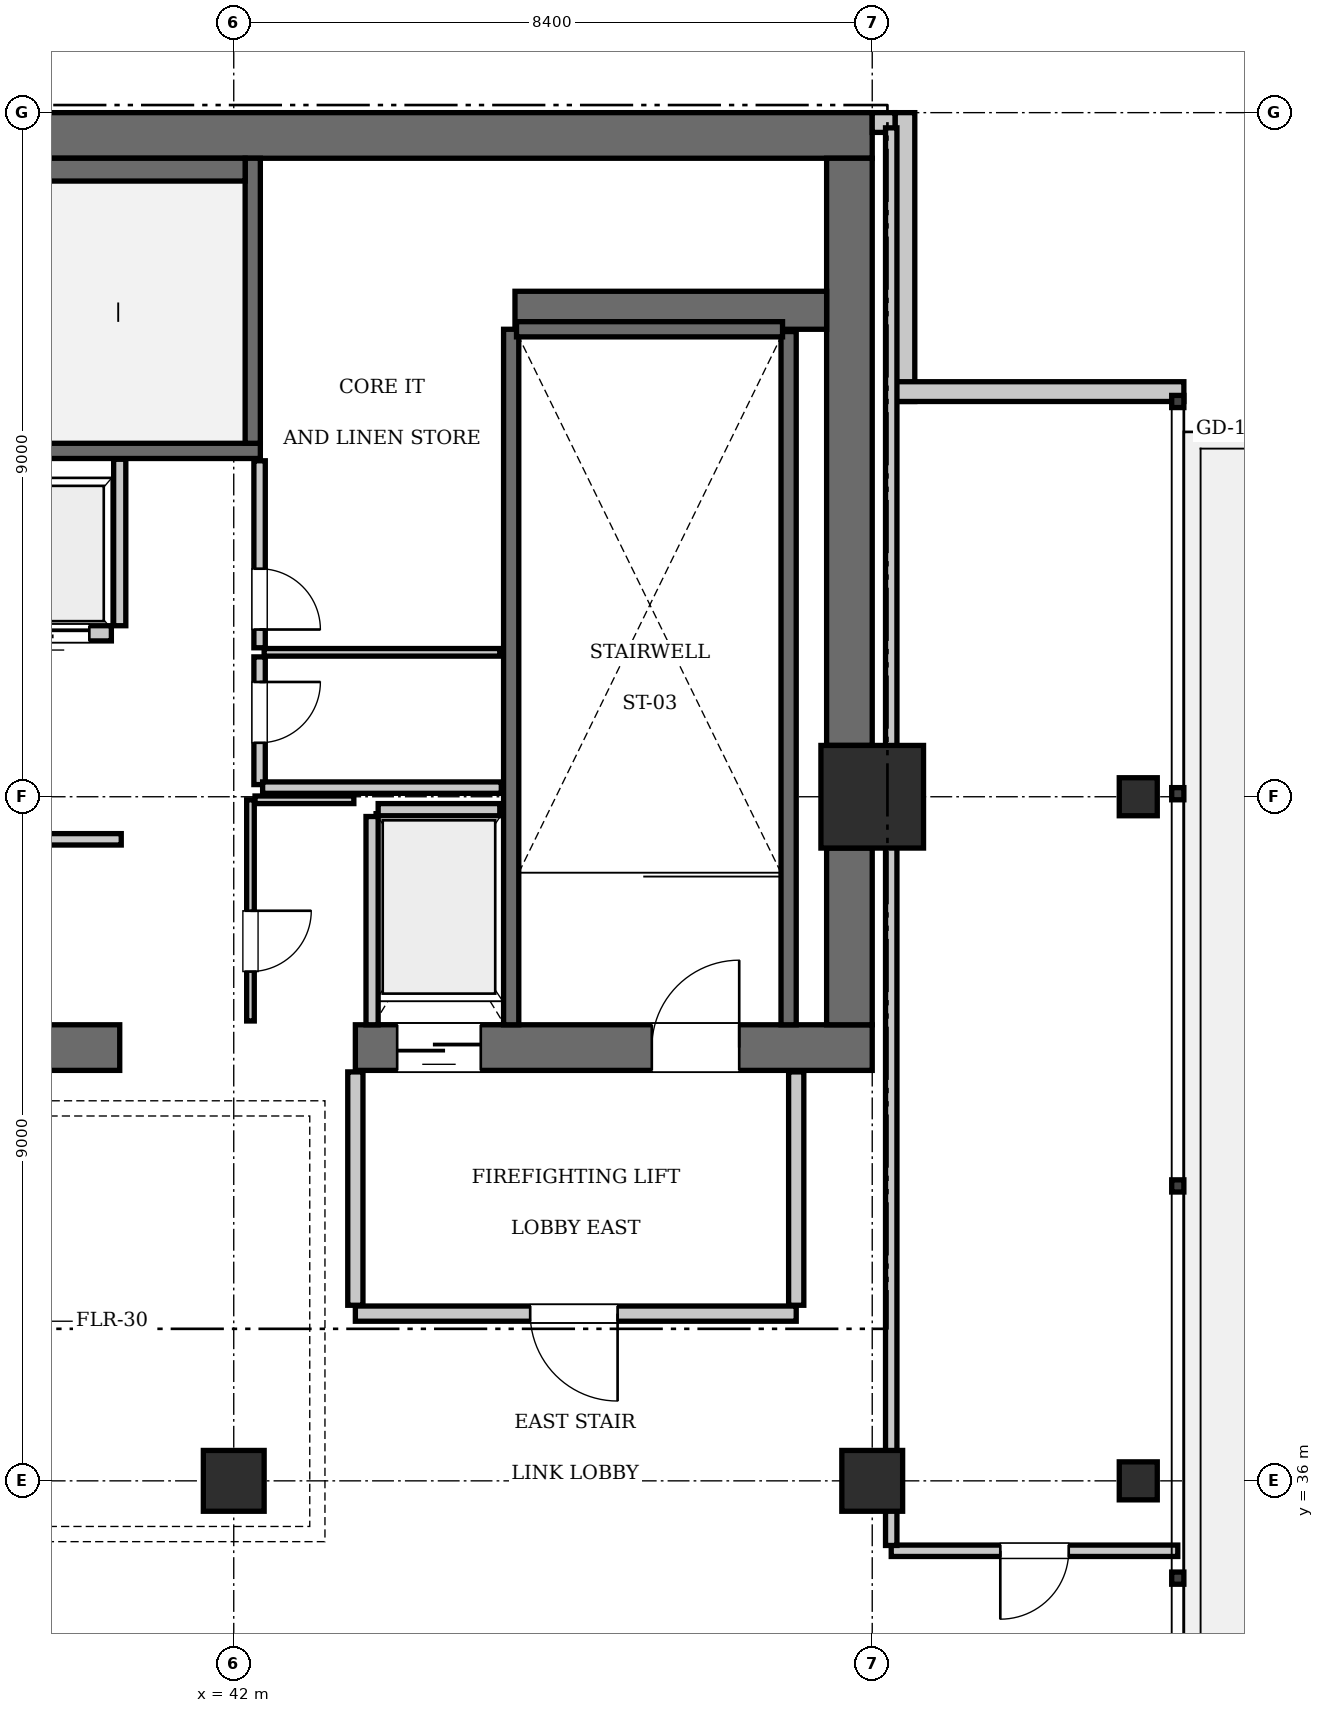
"""IFC4 building model, lengths in metres.
Left out: names, types, materials, properties, quantities, classifications, styles, units other than length and angle.
Written with IfcOpenShell. Run it as: python <this file> out.ifc"""

import sys

from ifc_helpers import new_model, si_unit, direction, frame, frame_2d, origin, origin_2d, place, context, subcontext, project, spatial, rectangle, i_section, extrude, element, fill, save


model = new_model("IFC4")
c1 = context("Model", 3, precision=1e-05, world=origin(), true_north=direction((0.0, 1.0)))
c2 = subcontext(c1, "Body", "Model", "MODEL_VIEW")
j1 = project(units=[si_unit("LENGTHUNIT", "METRE"), si_unit("PLANEANGLEUNIT", "RADIAN")], contexts=[c1])
p1 = place(None, origin())
s1 = spatial("IfcSite", under=j1, at=p1, CompositionType="ELEMENT")
p2 = place(p1, origin())
s2 = spatial("IfcBuilding", under=s1, at=p2, CompositionType="ELEMENT")
p3 = place(p2, frame((0.0, 0.0, 359.1)))
s3 = spatial("IfcBuildingStorey", under=s2, at=p3, CompositionType="ELEMENT", Elevation=359.1)
p4 = place(p3, frame((50.4, 45.0, 0.0), z_axis=(0.0, 0.0, 1.0), x_axis=(1.0, 0.0, 0.0)))
e1 = element("IfcColumn", 1, at=p4, inside=s3, PredefinedType="COLUMN", context=c2, shape_type="SweptSolid", body=[
    extrude(rectangle(XDim=1.35, YDim=1.35, at=origin_2d()), origin(), (0.0, 0.0, 1.0), 5.25),
])
p5 = place(p3, frame((25.2, 53.7, 0.0), z_axis=(0.0, 0.0, 1.0), x_axis=(1.0, 0.0, 0.0)))
e2 = element("IfcWall", 2, at=p5, inside=s3, PredefinedType="SHEAR", context=c2, shape_type="SweptSolid", body=[
    extrude(rectangle(XDim=25.2, YDim=0.6, at=frame_2d((12.6, 0.0))), origin(), (0.0, 0.0, 1.0), 5.25),
])
p6 = place(p3, frame((35.1, 41.7, 0.0), z_axis=(0.0, 0.0, 1.0), x_axis=(1.0, 0.0, 0.0)))
e3 = element("IfcWall", 3, at=p6, inside=s3, PredefinedType="SHEAR", context=c2, shape_type="SweptSolid", body=[
    extrude(rectangle(XDim=5.4, YDim=0.6, at=frame_2d((2.7, 0.0))), origin(), (0.0, 0.0, 1.0), 5.25),
])
p7 = place(p3, frame((43.6, 41.7, 0.0), z_axis=(0.0, 0.0, 1.0), x_axis=(1.0, 0.0, 0.0)))
e4 = element("IfcWall", 4, at=p7, inside=s3, PredefinedType="SHEAR", context=c2, shape_type="SweptSolid", body=[
    extrude(rectangle(XDim=6.8, YDim=0.6, at=frame_2d((3.4, 0.0))), origin(), (0.0, 0.0, 1.0), 5.25),
])
p8 = place(p7, frame((3.9, 0.0, 0.0)))
e5 = element("IfcOpeningElement", 5, at=p8, cuts=e4, PredefinedType="OPENING", context=c2, shape_type="SweptSolid", body=[
    extrude(rectangle(XDim=1.15, YDim=2.15, at=frame_2d((0.575, 1.075))), frame((0.0, 0.31, 0.0), z_axis=(0.0, -1.0, 0.0), x_axis=(1.0, 0.0, 0.0)), (0.0, 0.0, 1.0), 0.62),
])
p9 = place(p7, frame((0.55, 0.0, 0.0)))
e6 = element("IfcOpeningElement", 6, at=p9, cuts=e4, PredefinedType="OPENING", context=c2, shape_type="SweptSolid", body=[
    extrude(rectangle(XDim=1.1, YDim=2.2, at=frame_2d((0.55, 1.1))), frame((0.0, 0.31, 0.0), z_axis=(0.0, -1.0, 0.0), x_axis=(1.0, 0.0, 0.0)), (0.0, 0.0, 1.0), 0.62),
])
p10 = place(p3, frame((50.1, 42.0, 0.0), z_axis=(0.0, 0.0, 1.0), x_axis=(0.0, 1.0, 0.0)))
e7 = element("IfcWall", 7, at=p10, inside=s3, PredefinedType="SHEAR", context=c2, shape_type="SweptSolid", body=[
    extrude(rectangle(XDim=2.325, YDim=0.6, at=frame_2d((1.163, 0.0))), origin(), (0.0, 0.0, 1.0), 5.25),
])
p11 = place(p3, frame((50.1, 45.675, 0.0), z_axis=(0.0, 0.0, 1.0), x_axis=(0.0, 1.0, 0.0)))
e8 = element("IfcWall", 8, at=p11, inside=s3, PredefinedType="SHEAR", context=c2, shape_type="SweptSolid", body=[
    extrude(rectangle(XDim=7.725, YDim=0.6, at=frame_2d((3.862, 0.0))), origin(), (0.0, 0.0, 1.0), 5.25),
])
p12 = place(p3, frame((45.7, 51.4, 0.0), z_axis=(0.0, 0.0, 1.0), x_axis=(1.0, 0.0, 0.0)))
e9 = element("IfcWall", 9, at=p12, inside=s3, PredefinedType="SHEAR", context=c2, shape_type="SweptSolid", body=[
    extrude(rectangle(XDim=4.1, YDim=0.5, at=frame_2d((2.05, 0.0))), origin(), (0.0, 0.0, 1.0), 5.25),
])
for number, where, z_axis, x_axis in (
    (10, (42.0, 36.0, 0.0), (0.0, 0.0, 1.0), (1.0, 0.0, 0.0)),
    (11, (50.4, 36.0, 0.0), (0.0, 0.0, 1.0), (1.0, 0.0, 0.0)),
):
    element("IfcColumn", number, at=place(p3, frame(where, z_axis=z_axis, x_axis=x_axis)), inside=s3, PredefinedType="COLUMN", context=c2, shape_type="SweptSolid", body=[
        extrude(rectangle(XDim=0.8, YDim=0.8, at=origin_2d()), origin(), (0.0, 0.0, 1.0), 5.25),
    ])
for number, where, z_axis, x_axis in (
    (12, (53.9, 36.0, -0.26), (0.0, 0.0, 1.0), (1.0, 0.0, 0.0)),
    (13, (53.9, 45.0, -0.26), (0.0, 0.0, 1.0), (1.0, 0.0, 0.0)),
):
    element("IfcColumn", number, at=place(p3, frame(where, z_axis=z_axis, x_axis=x_axis)), inside=s3, PredefinedType="COLUMN", context=c2, shape_type="SweptSolid", body=[
        extrude(i_section(OverallWidth=0.5, OverallDepth=0.5, WebThickness=0.022, FlangeThickness=0.032, at=origin_2d()), origin(), (0.0, 0.0, 1.0), 5.51),
    ])
p13 = place(p3, frame((33.25, 49.55, 0.0), z_axis=(0.0, 0.0, 1.0), x_axis=(1.0, 0.0, 0.0)))
e14 = element("IfcWall", 14, at=p13, inside=s3, PredefinedType="SOLIDWALL", context=c2, shape_type="SweptSolid", body=[
    extrude(rectangle(XDim=9.1, YDim=0.2, at=frame_2d((4.55, 0.0))), origin(), (0.0, 0.0, 1.0), 4.97),
])
p14 = place(p3, frame((42.25, 49.65, 0.0), z_axis=(0.0, 0.0, 1.0), x_axis=(0.0, 1.0, 0.0)))
e15 = element("IfcWall", 15, at=p14, inside=s3, PredefinedType="SOLIDWALL", context=c2, shape_type="SweptSolid", body=[
    extrude(rectangle(XDim=3.75, YDim=0.2, at=frame_2d((1.875, 0.0))), origin(), (0.0, 0.0, 1.0), 4.97),
])
p15 = place(p3, frame((33.45, 53.25, 0.0), z_axis=(0.0, 0.0, 1.0), x_axis=(1.0, 0.0, 0.0)))
e16 = element("IfcWall", 16, at=p15, inside=s3, PredefinedType="SOLIDWALL", context=c2, shape_type="SweptSolid", body=[
    extrude(rectangle(XDim=8.7, YDim=0.3, at=frame_2d((4.35, 0.0))), origin(), (0.0, 0.0, 1.0), 4.97),
])
p16 = place(p3, frame((45.65, 42.0, 0.0), z_axis=(0.0, 0.0, 1.0), x_axis=(0.0, 1.0, 0.0)))
e17 = element("IfcWall", 17, at=p16, inside=s3, PredefinedType="SOLIDWALL", context=c2, shape_type="SweptSolid", body=[
    extrude(rectangle(XDim=9.15, YDim=0.2, at=frame_2d((4.575, 0.0))), origin(), (0.0, 0.0, 1.0), 4.97),
])
p17 = place(p3, frame((49.3, 42.0, 0.0), z_axis=(0.0, 0.0, 1.0), x_axis=(0.0, 1.0, 0.0)))
e18 = element("IfcWall", 18, at=p17, inside=s3, PredefinedType="SOLIDWALL", context=c2, shape_type="SweptSolid", body=[
    extrude(rectangle(XDim=9.12, YDim=0.2, at=frame_2d((4.56, 0.0))), origin(), (0.0, 0.0, 1.0), 4.97),
])
p18 = place(p3, frame((45.72, 51.15, 0.0), z_axis=(0.0, 0.0, 1.0), x_axis=(1.0, 0.0, 0.0)))
e19 = element("IfcWall", 19, at=p18, inside=s3, PredefinedType="SOLIDWALL", context=c2, shape_type="SweptSolid", body=[
    extrude(rectangle(XDim=3.5, YDim=0.2, at=frame_2d((1.75, 0.0))), origin(), (0.0, 0.0, 1.0), 4.97),
])
p19 = place(p3, frame((38.71, 47.15, 0.0), z_axis=(0.0, 0.0, 1.0), x_axis=(1.0, 0.0, 0.0)))
e20 = element("IfcWall", 20, at=p19, inside=s3, PredefinedType="SOLIDWALL", context=c2, shape_type="SweptSolid", body=[
    extrude(rectangle(XDim=1.68, YDim=0.2, at=frame_2d((0.84, 0.0))), origin(), (0.0, 0.0, 1.0), 4.97),
])
p20 = place(p19, frame((0.29, 0.0, 0.0)))
e21 = element("IfcOpeningElement", 21, at=p20, cuts=e20, PredefinedType="OPENING", context=c2, shape_type="SweptSolid", body=[
    extrude(rectangle(XDim=1.1, YDim=2.2, at=frame_2d((0.55, 1.1))), frame((0.0, 0.11, 0.0), z_axis=(0.0, -1.0, 0.0), x_axis=(1.0, 0.0, 0.0)), (0.0, 0.0, 1.0), 0.22),
])
p21 = place(p3, frame((43.9, 44.83, 0.0), z_axis=(0.0, 0.0, 1.0), x_axis=(1.0, 0.0, 0.0)))
e22 = element("IfcWall", 22, at=p21, inside=s3, PredefinedType="SOLIDWALL", context=c2, shape_type="SweptSolid", body=[
    extrude(rectangle(XDim=1.6, YDim=0.16, at=frame_2d((0.8, 0.0))), origin(), (0.0, 0.0, 1.0), 4.97),
])
p22 = place(p3, frame((43.82, 42.0, 0.0), z_axis=(0.0, 0.0, 1.0), x_axis=(0.0, 1.0, 0.0)))
e23 = element("IfcWall", 23, at=p22, inside=s3, PredefinedType="SOLIDWALL", context=c2, shape_type="SweptSolid", body=[
    extrude(rectangle(XDim=2.74, YDim=0.16, at=frame_2d((1.37, 0.0))), origin(), (0.0, 0.0, 1.0), 4.97),
])
p23 = place(p3, frame((40.5, 47.25, 0.0), z_axis=(0.0, 0.0, 1.0), x_axis=(0.0, 1.0, 0.0)))
e24 = element("IfcWall", 24, at=p23, inside=s3, PredefinedType="SOLIDWALL", context=c2, shape_type="SweptSolid", body=[
    extrude(rectangle(XDim=2.19, YDim=0.16, at=frame_2d((1.095, 0.0))), origin(), (0.0, 0.0, 1.0), 4.97),
])
for number, where, z_axis, x_axis in (
    (25, (50.83, 54.0, 0.0), (0.0, 0.0, 1.0), (0.0, -1.0, 0.0)),
    (26, (50.7, 50.33, 0.0), (0.0, 0.0, 1.0), (1.0, 0.0, 0.0)),
):
    element("IfcWall", number, at=place(p3, frame(where, z_axis=z_axis, x_axis=x_axis)), inside=s3, PredefinedType="SOLIDWALL", context=c2, shape_type="SweptSolid", body=[
        extrude(rectangle(XDim=3.8, YDim=0.26, at=frame_2d((1.9, 0.0))), origin(), (0.0, 0.0, 1.0), 4.97),
    ])
p24 = place(p3, frame((50.7, 53.87, 0.0), z_axis=(0.0, 0.0, 1.0), x_axis=(-1.0, 0.0, 0.0)))
e27 = element("IfcWall", 27, at=p24, inside=s3, PredefinedType="SOLIDWALL", context=c2, shape_type="SweptSolid", body=[
    extrude(rectangle(XDim=0.3, YDim=0.26, at=frame_2d((0.15, 0.0))), origin(), (0.0, 0.0, 1.0), 4.97),
])
p25 = place(p3, frame((43.6, 38.2, 0.0), z_axis=(0.0, 0.0, 1.0), x_axis=(1.0, 0.0, 0.0)))
e28 = element("IfcWall", 28, at=p25, inside=s3, PredefinedType="PARTITIONING", context=c2, shape_type="SweptSolid", body=[
    extrude(rectangle(XDim=5.8, YDim=0.2, at=frame_2d((2.9, 0.0))), origin(), (0.0, 0.0, 1.0), 4.97),
])
p26 = place(p25, frame((2.3, 0.0, 0.0)))
e29 = element("IfcOpeningElement", 29, at=p26, cuts=e28, PredefinedType="OPENING", context=c2, shape_type="SweptSolid", body=[
    extrude(rectangle(XDim=1.15, YDim=2.15, at=frame_2d((0.575, 1.075))), frame((0.0, 0.11, 0.0), z_axis=(0.0, -1.0, 0.0), x_axis=(1.0, 0.0, 0.0)), (0.0, 0.0, 1.0), 0.22),
])
for number, where, z_axis, x_axis in (
    (30, (43.6, 38.31, 0.0), (0.0, 0.0, 1.0), (0.0, 1.0, 0.0)),
    (31, (49.4, 38.31, 0.0), (0.0, 0.0, 1.0), (0.0, 1.0, 0.0)),
):
    element("IfcWall", number, at=place(p3, frame(where, z_axis=z_axis, x_axis=x_axis)), inside=s3, PredefinedType="PARTITIONING", context=c2, shape_type="SweptSolid", body=[
        extrude(rectangle(XDim=3.07, YDim=0.2, at=frame_2d((1.535, 0.0))), origin(), (0.0, 0.0, 1.0), 4.97),
    ])
p27 = place(p3, frame((42.22, 42.05, 0.0), z_axis=(0.0, 0.0, 1.0), x_axis=(0.0, 1.0, 0.0)))
e32 = element("IfcWall", 32, at=p27, inside=s3, PredefinedType="PARTITIONING", context=c2, shape_type="SweptSolid", body=[
    extrude(rectangle(XDim=2.91, YDim=0.1, at=frame_2d((1.455, 0.0))), origin(), (0.0, 0.0, 1.0), 4.97),
])
p28 = place(p27, frame((0.65, 0.0, 0.0)))
e33 = element("IfcOpeningElement", 33, at=p28, cuts=e32, PredefinedType="OPENING", context=c2, shape_type="SweptSolid", body=[
    extrude(rectangle(XDim=0.8, YDim=2.05, at=frame_2d((0.4, 1.025))), frame((0.0, 0.06, 0.0), z_axis=(0.0, -1.0, 0.0), x_axis=(1.0, 0.0, 0.0)), (0.0, 0.0, 1.0), 0.12),
])
p29 = place(p3, frame((42.28, 44.96, 0.0), z_axis=(0.0, 0.0, 1.0), x_axis=(1.0, 0.0, 0.0)))
e34 = element("IfcWall", 34, at=p29, inside=s3, PredefinedType="PARTITIONING", context=c2, shape_type="SweptSolid", body=[
    extrude(rectangle(XDim=1.3, YDim=0.1, at=frame_2d((0.65, 0.0))), origin(), (0.0, 0.0, 1.0), 4.97),
])
p30 = place(p3, frame((35.56, 44.44, 0.0), z_axis=(0.0, 0.0, 1.0), x_axis=(1.0, 0.0, 0.0)))
e35 = element("IfcWall", 35, at=p30, inside=s3, PredefinedType="PARTITIONING", context=c2, shape_type="SweptSolid", body=[
    extrude(rectangle(XDim=4.96, YDim=0.15, at=frame_2d((2.48, 0.0))), origin(), (0.0, 0.0, 1.0), 4.97),
])
p31 = place(p30, frame((1.8, 0.0, 0.0)))
e36 = element("IfcOpeningElement", 36, at=p31, cuts=e35, PredefinedType="OPENING", context=c2, shape_type="SweptSolid", body=[
    extrude(rectangle(XDim=0.9, YDim=2.1, at=frame_2d((0.45, 1.05))), frame((0.0, 0.085, 0.0), z_axis=(0.0, -1.0, 0.0), x_axis=(1.0, 0.0, 0.0)), (0.0, 0.0, 1.0), 0.17),
])
p32 = place(p3, frame((42.34, 45.16, 0.0), z_axis=(0.0, 0.0, 1.0), x_axis=(0.0, 1.0, 0.0)))
e37 = element("IfcWall", 37, at=p32, inside=s3, PredefinedType="PARTITIONING", context=c2, shape_type="SweptSolid", body=[
    extrude(rectangle(XDim=1.68, YDim=0.15, at=frame_2d((0.84, 0.0))), origin(), (0.0, 0.0, 1.0), 4.97),
])
p33 = place(p32, frame((0.55, 0.0, 0.0)))
e38 = element("IfcOpeningElement", 38, at=p33, cuts=e37, PredefinedType="OPENING", context=c2, shape_type="SweptSolid", body=[
    extrude(rectangle(XDim=0.8, YDim=2.05, at=frame_2d((0.4, 1.025))), frame((0.0, 0.085, 0.0), z_axis=(0.0, -1.0, 0.0), x_axis=(1.0, 0.0, 0.0)), (0.0, 0.0, 1.0), 0.17),
])
p34 = place(p3, frame((42.34, 46.96, 0.0), z_axis=(0.0, 0.0, 1.0), x_axis=(0.0, 1.0, 0.0)))
e39 = element("IfcWall", 39, at=p34, inside=s3, PredefinedType="PARTITIONING", context=c2, shape_type="SweptSolid", body=[
    extrude(rectangle(XDim=2.46, YDim=0.15, at=frame_2d((1.23, 0.0))), origin(), (0.0, 0.0, 1.0), 4.97),
])
p35 = place(p34, frame((0.24, 0.0, 0.0)))
e40 = element("IfcOpeningElement", 40, at=p35, cuts=e39, PredefinedType="OPENING", context=c2, shape_type="SweptSolid", body=[
    extrude(rectangle(XDim=0.8, YDim=2.05, at=frame_2d((0.4, 1.025))), frame((0.0, 0.085, 0.0), z_axis=(0.0, -1.0, 0.0), x_axis=(1.0, 0.0, 0.0)), (0.0, 0.0, 1.0), 0.17),
])
p36 = place(p3, frame((42.4, 46.9, 0.0), z_axis=(0.0, 0.0, 1.0), x_axis=(1.0, 0.0, 0.0)))
e41 = element("IfcWall", 41, at=p36, inside=s3, PredefinedType="PARTITIONING", context=c2, shape_type="SweptSolid", body=[
    extrude(rectangle(XDim=3.1, YDim=0.1, at=frame_2d((1.55, 0.0))), origin(), (0.0, 0.0, 1.0), 4.97),
])
p37 = place(p3, frame((42.38, 45.12, 0.0), z_axis=(0.0, 0.0, 1.0), x_axis=(1.0, 0.0, 0.0)))
e42 = element("IfcWall", 42, at=p37, inside=s3, PredefinedType="PARTITIONING", context=c2, shape_type="SweptSolid", body=[
    extrude(rectangle(XDim=3.14, YDim=0.15, at=frame_2d((1.57, 0.0))), origin(), (0.0, 0.0, 1.0), 4.97),
])
p38 = place(p3, frame((50.65, 35.08, 0.0), z_axis=(0.0, 0.0, 1.0), x_axis=(1.0, 0.0, 0.0)))
e43 = element("IfcWall", 43, at=p38, inside=s3, PredefinedType="PARTITIONING", context=c2, shape_type="SweptSolid", body=[
    extrude(rectangle(XDim=3.77, YDim=0.15, at=frame_2d((1.885, 0.0))), origin(), (0.0, 0.0, 1.0), 4.97),
])
p39 = place(p38, frame((1.435, 0.0, 0.0)))
e44 = element("IfcOpeningElement", 44, at=p39, cuts=e43, PredefinedType="OPENING", context=c2, shape_type="SweptSolid", body=[
    extrude(rectangle(XDim=0.9, YDim=2.1, at=frame_2d((0.45, 1.05))), frame((0.0, 0.085, 0.0), z_axis=(0.0, -1.0, 0.0), x_axis=(1.0, 0.0, 0.0)), (0.0, 0.0, 1.0), 0.17),
])
p40 = place(p3, frame((50.65, 35.15, 0.0), z_axis=(0.0, 0.0, 1.0), x_axis=(0.0, 1.0, 0.0)))
e45 = element("IfcWall", 45, at=p40, inside=s3, PredefinedType="PARTITIONING", context=c2, shape_type="SweptSolid", body=[
    extrude(rectangle(XDim=18.65, YDim=0.15, at=frame_2d((9.325, 0.0))), origin(), (0.0, 0.0, 1.0), 4.97),
])
p41 = place(p8, origin())
e46 = element("IfcDoor", 46, at=p41, inside=s3, OperationType="SINGLE_SWING_RIGHT", PredefinedType="DOOR", context=c2, shape_type="SweptSolid", body=[
    extrude(rectangle(XDim=1.15, YDim=2.15, at=frame_2d((0.575, 1.075))), frame((0.0, 0.025, 0.0), z_axis=(0.0, -1.0, 0.0), x_axis=(1.0, 0.0, 0.0)), (0.0, 0.0, 1.0), 0.05),
])
fill(e5, e46)
p42 = place(p20, frame((1.1, 0.0, 0.0), z_axis=(0.0, 0.0, 1.0), x_axis=(-1.0, 0.0, 0.0)))
e47 = element("IfcDoor", 47, at=p42, inside=s3, OperationType="SLIDING_TO_RIGHT", PredefinedType="DOOR", context=c2, shape_type="SweptSolid", body=[
    extrude(rectangle(XDim=1.1, YDim=2.2, at=frame_2d((0.55, 1.1))), frame((0.0, 0.025, 0.0), z_axis=(0.0, -1.0, 0.0), x_axis=(1.0, 0.0, 0.0)), (0.0, 0.0, 1.0), 0.05),
])
fill(e21, e47)
p43 = place(p9, frame((1.1, 0.0, 0.0), z_axis=(0.0, 0.0, 1.0), x_axis=(-1.0, 0.0, 0.0)))
e48 = element("IfcDoor", 48, at=p43, inside=s3, OperationType="SLIDING_TO_LEFT", PredefinedType="DOOR", context=c2, shape_type="SweptSolid", body=[
    extrude(rectangle(XDim=1.1, YDim=2.2, at=frame_2d((0.55, 1.1))), frame((0.0, 0.025, 0.0), z_axis=(0.0, -1.0, 0.0), x_axis=(1.0, 0.0, 0.0)), (0.0, 0.0, 1.0), 0.05),
])
fill(e6, e48)
p44 = place(p26, frame((1.15, 0.0, 0.0), z_axis=(0.0, 0.0, 1.0), x_axis=(-1.0, 0.0, 0.0)))
e49 = element("IfcDoor", 49, at=p44, inside=s3, OperationType="SINGLE_SWING_LEFT", PredefinedType="DOOR", context=c2, shape_type="SweptSolid", body=[
    extrude(rectangle(XDim=1.15, YDim=2.15, at=frame_2d((0.575, 1.075))), frame((0.0, 0.025, 0.0), z_axis=(0.0, -1.0, 0.0), x_axis=(1.0, 0.0, 0.0)), (0.0, 0.0, 1.0), 0.05),
])
fill(e29, e49)
p45 = place(p28, frame((0.8, 0.0, 0.0), z_axis=(0.0, 0.0, 1.0), x_axis=(-1.0, 0.0, 0.0)))
e50 = element("IfcDoor", 50, at=p45, inside=s3, OperationType="SINGLE_SWING_LEFT", PredefinedType="DOOR", context=c2, shape_type="SweptSolid", body=[
    extrude(rectangle(XDim=0.8, YDim=2.05, at=frame_2d((0.4, 1.025))), frame((0.0, 0.025, 0.0), z_axis=(0.0, -1.0, 0.0), x_axis=(1.0, 0.0, 0.0)), (0.0, 0.0, 1.0), 0.05),
])
fill(e33, e50)
p46 = place(p33, frame((0.8, 0.0, 0.0), z_axis=(0.0, 0.0, 1.0), x_axis=(-1.0, 0.0, 0.0)))
e51 = element("IfcDoor", 51, at=p46, inside=s3, OperationType="SINGLE_SWING_LEFT", PredefinedType="DOOR", context=c2, shape_type="SweptSolid", body=[
    extrude(rectangle(XDim=0.8, YDim=2.05, at=frame_2d((0.4, 1.025))), frame((0.0, 0.025, 0.0), z_axis=(0.0, -1.0, 0.0), x_axis=(1.0, 0.0, 0.0)), (0.0, 0.0, 1.0), 0.05),
])
fill(e38, e51)
p47 = place(p35, frame((0.8, 0.0, 0.0), z_axis=(0.0, 0.0, 1.0), x_axis=(-1.0, 0.0, 0.0)))
e52 = element("IfcDoor", 52, at=p47, inside=s3, OperationType="SINGLE_SWING_RIGHT", PredefinedType="DOOR", context=c2, shape_type="SweptSolid", body=[
    extrude(rectangle(XDim=0.8, YDim=2.05, at=frame_2d((0.4, 1.025))), frame((0.0, 0.025, 0.0), z_axis=(0.0, -1.0, 0.0), x_axis=(1.0, 0.0, 0.0)), (0.0, 0.0, 1.0), 0.05),
])
fill(e40, e52)
p48 = place(p39, frame((0.9, 0.0, 0.0), z_axis=(0.0, 0.0, 1.0), x_axis=(-1.0, 0.0, 0.0)))
e53 = element("IfcDoor", 53, at=p48, inside=s3, OperationType="SINGLE_SWING_RIGHT", PredefinedType="DOOR", context=c2, shape_type="SweptSolid", body=[
    extrude(rectangle(XDim=0.9, YDim=2.1, at=frame_2d((0.45, 1.05))), frame((0.0, 0.025, 0.0), z_axis=(0.0, -1.0, 0.0), x_axis=(1.0, 0.0, 0.0)), (0.0, 0.0, 1.0), 0.05),
])
fill(e44, e53)
save(model, sys.argv[1])
